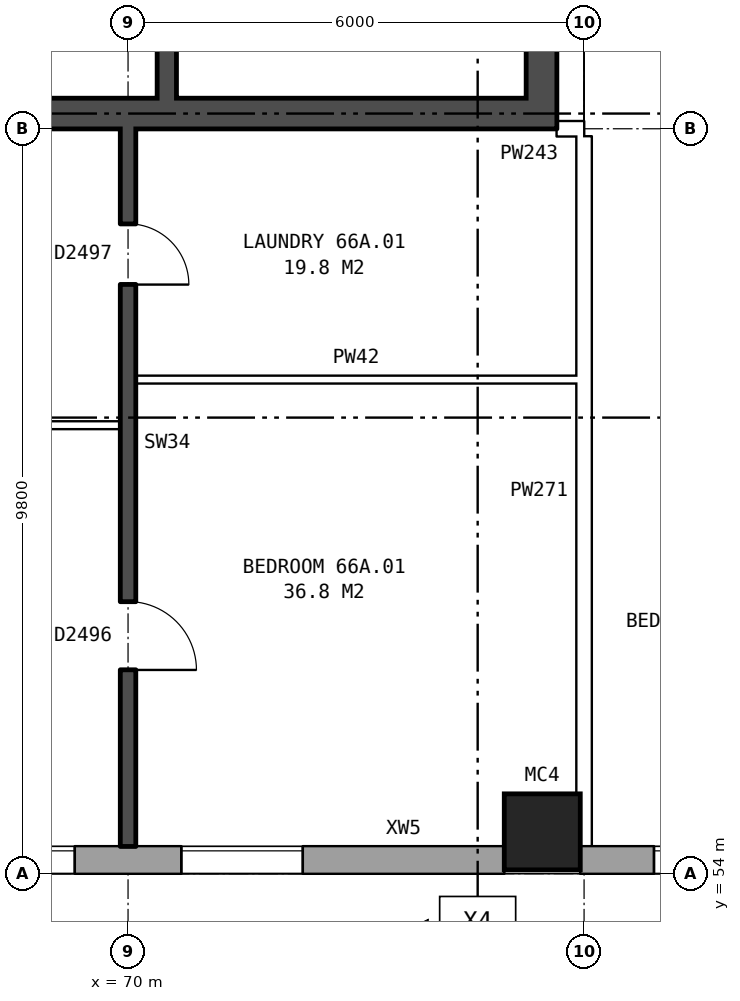
"""IFC4 building model, lengths in metres.
Left out: names, types, materials, properties, quantities, classifications, styles, units other than length and angle.
Written with IfcOpenShell. Run it as: python <this file> out.ifc"""

import sys

from ifc_helpers import new_model, si_unit, direction, frame, frame_2d, origin, origin_2d, place, context, subcontext, project, spatial, rectangle, hollow_rectangle, extrude, element, fill, save


model = new_model("IFC4")
c1 = context("Model", 3, precision=1e-05, world=origin(), true_north=direction((0.0, 1.0)))
c2 = subcontext(c1, "Body", "Model", "MODEL_VIEW")
j1 = project(units=[si_unit("LENGTHUNIT", "METRE"), si_unit("PLANEANGLEUNIT", "RADIAN")], contexts=[c1])
p1 = place(None, origin())
s1 = spatial("IfcSite", under=j1, at=p1, CompositionType="ELEMENT")
p2 = place(p1, origin())
s2 = spatial("IfcBuilding", under=s1, at=p2, CompositionType="ELEMENT")
p3 = place(p2, frame((0.0, 0.0, 233.8)))
s3 = spatial("IfcBuildingStorey", under=s2, at=p3, CompositionType="ELEMENT", Elevation=233.8)
p4 = place(p3, frame((75.45, 54.55, 0.0), z_axis=(0.0, 0.0, 1.0), x_axis=(1.0, 0.0, 0.0)))
e1 = element("IfcColumn", 1, at=p4, inside=s3, PredefinedType="COLUMN", context=c2, shape_type="SweptSolid", body=[
    extrude(hollow_rectangle(XDim=1.0, YDim=1.0, WallThickness=0.055, at=origin_2d()), origin(), (0.0, 0.0, 1.0), 3.1),
])
p5 = place(p3, frame((35.075, 54.18, 0.0), z_axis=(0.0, 0.0, 1.0), x_axis=(1.0, 0.0, 0.0)))
e2 = element("IfcWall", 2, at=p5, inside=s3, PredefinedType="STANDARD", context=c2, shape_type="SweptSolid", body=[
    extrude(rectangle(XDim=39.875, YDim=0.36, at=frame_2d((19.938, 0.0))), origin(), (0.0, 0.0, 1.0), 2.85),
])
p6 = place(p5, frame((2.625, 0.0, 0.8)))
e3 = element("IfcOpeningElement", 3, at=p6, cuts=e2, PredefinedType="OPENING", context=c2, shape_type="SweptSolid", body=[
    extrude(rectangle(XDim=1.6, YDim=1.8, at=frame_2d((0.8, 0.9))), frame((0.0, 0.19, 0.0), z_axis=(0.0, -1.0, 0.0), x_axis=(1.0, 0.0, 0.0)), (0.0, 0.0, 1.0), 0.38),
])
p7 = place(p5, frame((5.625, 0.0, 0.8)))
e4 = element("IfcOpeningElement", 4, at=p7, cuts=e2, PredefinedType="OPENING", context=c2, shape_type="SweptSolid", body=[
    extrude(rectangle(XDim=1.6, YDim=1.8, at=frame_2d((0.8, 0.9))), frame((0.0, 0.19, 0.0), z_axis=(0.0, -1.0, 0.0), x_axis=(1.0, 0.0, 0.0)), (0.0, 0.0, 1.0), 0.38),
])
p8 = place(p5, frame((8.625, 0.0, 0.8)))
e5 = element("IfcOpeningElement", 5, at=p8, cuts=e2, PredefinedType="OPENING", context=c2, shape_type="SweptSolid", body=[
    extrude(rectangle(XDim=1.6, YDim=1.8, at=frame_2d((0.8, 0.9))), frame((0.0, 0.19, 0.0), z_axis=(0.0, -1.0, 0.0), x_axis=(1.0, 0.0, 0.0)), (0.0, 0.0, 1.0), 0.38),
])
p9 = place(p5, frame((11.625, 0.0, 0.8)))
e6 = element("IfcOpeningElement", 6, at=p9, cuts=e2, PredefinedType="OPENING", context=c2, shape_type="SweptSolid", body=[
    extrude(rectangle(XDim=1.6, YDim=1.8, at=frame_2d((0.8, 0.9))), frame((0.0, 0.19, 0.0), z_axis=(0.0, -1.0, 0.0), x_axis=(1.0, 0.0, 0.0)), (0.0, 0.0, 1.0), 0.38),
])
p10 = place(p5, frame((14.625, 0.0, 0.8)))
e7 = element("IfcOpeningElement", 7, at=p10, cuts=e2, PredefinedType="OPENING", context=c2, shape_type="SweptSolid", body=[
    extrude(rectangle(XDim=1.6, YDim=1.8, at=frame_2d((0.8, 0.9))), frame((0.0, 0.19, 0.0), z_axis=(0.0, -1.0, 0.0), x_axis=(1.0, 0.0, 0.0)), (0.0, 0.0, 1.0), 0.38),
])
p11 = place(p5, frame((18.475, 0.0, 0.15)))
e8 = element("IfcOpeningElement", 8, at=p11, cuts=e2, PredefinedType="OPENING", context=c2, shape_type="SweptSolid", body=[
    extrude(rectangle(XDim=0.8, YDim=0.9, at=frame_2d((0.4, 0.45))), frame((0.0, 0.19, 0.0), z_axis=(0.0, -1.0, 0.0), x_axis=(1.0, 0.0, 0.0)), (0.0, 0.0, 1.0), 0.38),
])
p12 = place(p5, frame((20.625, 0.0, 0.8)))
e9 = element("IfcOpeningElement", 9, at=p12, cuts=e2, PredefinedType="OPENING", context=c2, shape_type="SweptSolid", body=[
    extrude(rectangle(XDim=1.6, YDim=1.8, at=frame_2d((0.8, 0.9))), frame((0.0, 0.19, 0.0), z_axis=(0.0, -1.0, 0.0), x_axis=(1.0, 0.0, 0.0)), (0.0, 0.0, 1.0), 0.38),
])
p13 = place(p5, frame((23.625, 0.0, 0.8)))
e10 = element("IfcOpeningElement", 10, at=p13, cuts=e2, PredefinedType="OPENING", context=c2, shape_type="SweptSolid", body=[
    extrude(rectangle(XDim=1.6, YDim=1.8, at=frame_2d((0.8, 0.9))), frame((0.0, 0.19, 0.0), z_axis=(0.0, -1.0, 0.0), x_axis=(1.0, 0.0, 0.0)), (0.0, 0.0, 1.0), 0.38),
])
p14 = place(p5, frame((26.625, 0.0, 0.8)))
e11 = element("IfcOpeningElement", 11, at=p14, cuts=e2, PredefinedType="OPENING", context=c2, shape_type="SweptSolid", body=[
    extrude(rectangle(XDim=1.6, YDim=1.8, at=frame_2d((0.8, 0.9))), frame((0.0, 0.19, 0.0), z_axis=(0.0, -1.0, 0.0), x_axis=(1.0, 0.0, 0.0)), (0.0, 0.0, 1.0), 0.38),
])
p15 = place(p5, frame((29.625, 0.0, 0.8)))
e12 = element("IfcOpeningElement", 12, at=p15, cuts=e2, PredefinedType="OPENING", context=c2, shape_type="SweptSolid", body=[
    extrude(rectangle(XDim=1.6, YDim=1.8, at=frame_2d((0.8, 0.9))), frame((0.0, 0.19, 0.0), z_axis=(0.0, -1.0, 0.0), x_axis=(1.0, 0.0, 0.0)), (0.0, 0.0, 1.0), 0.38),
])
p16 = place(p5, frame((32.625, 0.0, 0.8)))
e13 = element("IfcOpeningElement", 13, at=p16, cuts=e2, PredefinedType="OPENING", context=c2, shape_type="SweptSolid", body=[
    extrude(rectangle(XDim=1.6, YDim=1.8, at=frame_2d((0.8, 0.9))), frame((0.0, 0.19, 0.0), z_axis=(0.0, -1.0, 0.0), x_axis=(1.0, 0.0, 0.0)), (0.0, 0.0, 1.0), 0.38),
])
p17 = place(p5, frame((35.625, 0.0, 0.8)))
e14 = element("IfcOpeningElement", 14, at=p17, cuts=e2, PredefinedType="OPENING", context=c2, shape_type="SweptSolid", body=[
    extrude(rectangle(XDim=1.6, YDim=1.8, at=frame_2d((0.8, 0.9))), frame((0.0, 0.19, 0.0), z_axis=(0.0, -1.0, 0.0), x_axis=(1.0, 0.0, 0.0)), (0.0, 0.0, 1.0), 0.38),
])
p18 = place(p3, frame((75.95, 54.18, 0.0), z_axis=(0.0, 0.0, 1.0), x_axis=(1.0, 0.0, 0.0)))
e15 = element("IfcWall", 15, at=p18, inside=s3, PredefinedType="STANDARD", context=c2, shape_type="SweptSolid", body=[
    extrude(rectangle(XDim=55.1, YDim=0.36, at=frame_2d((27.55, 0.0))), origin(), (0.0, 0.0, 1.0), 2.85),
])
p19 = place(p18, frame((0.969, 0.0, 0.8)))
e16 = element("IfcOpeningElement", 16, at=p19, cuts=e15, PredefinedType="OPENING", context=c2, shape_type="SweptSolid", body=[
    extrude(rectangle(XDim=1.6, YDim=1.8, at=frame_2d((0.8, 0.9))), frame((0.0, 0.19, 0.0), z_axis=(0.0, -1.0, 0.0), x_axis=(1.0, 0.0, 0.0)), (0.0, 0.0, 1.0), 0.38),
])
p20 = place(p18, frame((4.406, 0.0, 0.8)))
e17 = element("IfcOpeningElement", 17, at=p20, cuts=e15, PredefinedType="OPENING", context=c2, shape_type="SweptSolid", body=[
    extrude(rectangle(XDim=1.6, YDim=1.8, at=frame_2d((0.8, 0.9))), frame((0.0, 0.19, 0.0), z_axis=(0.0, -1.0, 0.0), x_axis=(1.0, 0.0, 0.0)), (0.0, 0.0, 1.0), 0.38),
])
p21 = place(p18, frame((7.844, 0.0, 0.8)))
e18 = element("IfcOpeningElement", 18, at=p21, cuts=e15, PredefinedType="OPENING", context=c2, shape_type="SweptSolid", body=[
    extrude(rectangle(XDim=1.6, YDim=1.8, at=frame_2d((0.8, 0.9))), frame((0.0, 0.19, 0.0), z_axis=(0.0, -1.0, 0.0), x_axis=(1.0, 0.0, 0.0)), (0.0, 0.0, 1.0), 0.38),
])
p22 = place(p18, frame((11.281, 0.0, 0.8)))
e19 = element("IfcOpeningElement", 19, at=p22, cuts=e15, PredefinedType="OPENING", context=c2, shape_type="SweptSolid", body=[
    extrude(rectangle(XDim=1.6, YDim=1.8, at=frame_2d((0.8, 0.9))), frame((0.0, 0.19, 0.0), z_axis=(0.0, -1.0, 0.0), x_axis=(1.0, 0.0, 0.0)), (0.0, 0.0, 1.0), 0.38),
])
p23 = place(p18, frame((14.719, 0.0, 0.8)))
e20 = element("IfcOpeningElement", 20, at=p23, cuts=e15, PredefinedType="OPENING", context=c2, shape_type="SweptSolid", body=[
    extrude(rectangle(XDim=1.6, YDim=1.8, at=frame_2d((0.8, 0.9))), frame((0.0, 0.19, 0.0), z_axis=(0.0, -1.0, 0.0), x_axis=(1.0, 0.0, 0.0)), (0.0, 0.0, 1.0), 0.38),
])
p24 = place(p18, frame((18.156, 0.0, 0.8)))
e21 = element("IfcOpeningElement", 21, at=p24, cuts=e15, PredefinedType="OPENING", context=c2, shape_type="SweptSolid", body=[
    extrude(rectangle(XDim=1.6, YDim=1.8, at=frame_2d((0.8, 0.9))), frame((0.0, 0.19, 0.0), z_axis=(0.0, -1.0, 0.0), x_axis=(1.0, 0.0, 0.0)), (0.0, 0.0, 1.0), 0.38),
])
p25 = place(p18, frame((21.594, 0.0, 0.8)))
e22 = element("IfcOpeningElement", 22, at=p25, cuts=e15, PredefinedType="OPENING", context=c2, shape_type="SweptSolid", body=[
    extrude(rectangle(XDim=1.6, YDim=1.8, at=frame_2d((0.8, 0.9))), frame((0.0, 0.19, 0.0), z_axis=(0.0, -1.0, 0.0), x_axis=(1.0, 0.0, 0.0)), (0.0, 0.0, 1.0), 0.38),
])
p26 = place(p18, frame((25.031, 0.0, 0.8)))
e23 = element("IfcOpeningElement", 23, at=p26, cuts=e15, PredefinedType="OPENING", context=c2, shape_type="SweptSolid", body=[
    extrude(rectangle(XDim=1.6, YDim=1.8, at=frame_2d((0.8, 0.9))), frame((0.0, 0.19, 0.0), z_axis=(0.0, -1.0, 0.0), x_axis=(1.0, 0.0, 0.0)), (0.0, 0.0, 1.0), 0.38),
])
p27 = place(p18, frame((28.469, 0.0, 0.8)))
e24 = element("IfcOpeningElement", 24, at=p27, cuts=e15, PredefinedType="OPENING", context=c2, shape_type="SweptSolid", body=[
    extrude(rectangle(XDim=1.6, YDim=1.8, at=frame_2d((0.8, 0.9))), frame((0.0, 0.19, 0.0), z_axis=(0.0, -1.0, 0.0), x_axis=(1.0, 0.0, 0.0)), (0.0, 0.0, 1.0), 0.38),
])
p28 = place(p18, frame((31.906, 0.0, 0.8)))
e25 = element("IfcOpeningElement", 25, at=p28, cuts=e15, PredefinedType="OPENING", context=c2, shape_type="SweptSolid", body=[
    extrude(rectangle(XDim=1.6, YDim=1.8, at=frame_2d((0.8, 0.9))), frame((0.0, 0.19, 0.0), z_axis=(0.0, -1.0, 0.0), x_axis=(1.0, 0.0, 0.0)), (0.0, 0.0, 1.0), 0.38),
])
p29 = place(p18, frame((35.344, 0.0, 0.8)))
e26 = element("IfcOpeningElement", 26, at=p29, cuts=e15, PredefinedType="OPENING", context=c2, shape_type="SweptSolid", body=[
    extrude(rectangle(XDim=1.6, YDim=1.8, at=frame_2d((0.8, 0.9))), frame((0.0, 0.19, 0.0), z_axis=(0.0, -1.0, 0.0), x_axis=(1.0, 0.0, 0.0)), (0.0, 0.0, 1.0), 0.38),
])
p30 = place(p18, frame((38.781, 0.0, 0.8)))
e27 = element("IfcOpeningElement", 27, at=p30, cuts=e15, PredefinedType="OPENING", context=c2, shape_type="SweptSolid", body=[
    extrude(rectangle(XDim=1.6, YDim=1.8, at=frame_2d((0.8, 0.9))), frame((0.0, 0.19, 0.0), z_axis=(0.0, -1.0, 0.0), x_axis=(1.0, 0.0, 0.0)), (0.0, 0.0, 1.0), 0.38),
])
p31 = place(p18, frame((42.219, 0.0, 0.8)))
e28 = element("IfcOpeningElement", 28, at=p31, cuts=e15, PredefinedType="OPENING", context=c2, shape_type="SweptSolid", body=[
    extrude(rectangle(XDim=1.6, YDim=1.8, at=frame_2d((0.8, 0.9))), frame((0.0, 0.19, 0.0), z_axis=(0.0, -1.0, 0.0), x_axis=(1.0, 0.0, 0.0)), (0.0, 0.0, 1.0), 0.38),
])
p32 = place(p18, frame((45.656, 0.0, 0.8)))
e29 = element("IfcOpeningElement", 29, at=p32, cuts=e15, PredefinedType="OPENING", context=c2, shape_type="SweptSolid", body=[
    extrude(rectangle(XDim=1.6, YDim=1.8, at=frame_2d((0.8, 0.9))), frame((0.0, 0.19, 0.0), z_axis=(0.0, -1.0, 0.0), x_axis=(1.0, 0.0, 0.0)), (0.0, 0.0, 1.0), 0.38),
])
p33 = place(p18, frame((49.094, 0.0, 0.8)))
e30 = element("IfcOpeningElement", 30, at=p33, cuts=e15, PredefinedType="OPENING", context=c2, shape_type="SweptSolid", body=[
    extrude(rectangle(XDim=1.6, YDim=1.8, at=frame_2d((0.8, 0.9))), frame((0.0, 0.19, 0.0), z_axis=(0.0, -1.0, 0.0), x_axis=(1.0, 0.0, 0.0)), (0.0, 0.0, 1.0), 0.38),
])
p34 = place(p18, frame((52.531, 0.0, 0.8)))
e31 = element("IfcOpeningElement", 31, at=p34, cuts=e15, PredefinedType="OPENING", context=c2, shape_type="SweptSolid", body=[
    extrude(rectangle(XDim=1.6, YDim=1.8, at=frame_2d((0.8, 0.9))), frame((0.0, 0.19, 0.0), z_axis=(0.0, -1.0, 0.0), x_axis=(1.0, 0.0, 0.0)), (0.0, 0.0, 1.0), 0.38),
])
p35 = place(p3, frame((75.44, 63.8, 0.0), z_axis=(0.0, 0.0, 1.0), x_axis=(0.0, 1.0, 0.0)))
e32 = element("IfcWall", 32, at=p35, inside=s3, PredefinedType="SHEAR", context=c2, shape_type="SweptSolid", body=[
    extrude(rectangle(XDim=12.4, YDim=0.4, at=frame_2d((6.2, 0.0))), origin(), (0.0, 0.0, 1.0), 2.85),
])
p36 = place(p35, frame((9.8, 0.0, 0.0)))
e33 = element("IfcOpeningElement", 33, at=p36, cuts=e32, PredefinedType="OPENING", context=c2, shape_type="SweptSolid", body=[
    extrude(rectangle(XDim=1.1, YDim=2.1, at=frame_2d((0.55, 1.05))), frame((0.0, 0.21, 0.0), z_axis=(0.0, -1.0, 0.0), x_axis=(1.0, 0.0, 0.0)), (0.0, 0.0, 1.0), 0.42),
])
p37 = place(p3, frame((67.04, 64.0, 0.0), z_axis=(0.0, 0.0, 1.0), x_axis=(1.0, 0.0, 0.0)))
e34 = element("IfcWall", 34, at=p37, inside=s3, PredefinedType="SHEAR", context=c2, shape_type="SweptSolid", body=[
    extrude(rectangle(XDim=8.2, YDim=0.4, at=frame_2d((4.1, 0.0))), origin(), (0.0, 0.0, 1.0), 2.85),
])
p38 = place(p3, frame((70.51, 64.2, 0.0), z_axis=(0.0, 0.0, 1.0), x_axis=(0.0, 1.0, 0.0)))
e35 = element("IfcWall", 35, at=p38, inside=s3, PredefinedType="SHEAR", context=c2, shape_type="SweptSolid", body=[
    extrude(rectangle(XDim=2.525, YDim=0.25, at=frame_2d((1.263, 0.0))), origin(), (0.0, 0.0, 1.0), 2.85),
])
p39 = place(p3, frame((64.1, 59.9, 0.0), z_axis=(0.0, 0.0, 1.0), x_axis=(1.0, 0.0, 0.0)))
e36 = element("IfcWall", 36, at=p39, inside=s3, PredefinedType="PARTITIONING", context=c2, shape_type="SweptSolid", body=[
    extrude(rectangle(XDim=5.8, YDim=0.1, at=frame_2d((2.9, 0.0))), origin(), (0.0, 0.0, 1.0), 2.85),
])
p40 = place(p39, frame((3.6, 0.0, 0.0)))
e37 = element("IfcOpeningElement", 37, at=p40, cuts=e36, PredefinedType="OPENING", context=c2, shape_type="SweptSolid", body=[
    extrude(rectangle(XDim=0.9, YDim=2.1, at=frame_2d((0.45, 1.05))), frame((0.0, 0.06, 0.0), z_axis=(0.0, -1.0, 0.0), x_axis=(1.0, 0.0, 0.0)), (0.0, 0.0, 1.0), 0.12),
])
p41 = place(p39, frame((0.7, 0.0, 0.0)))
e38 = element("IfcOpeningElement", 38, at=p41, cuts=e36, PredefinedType="OPENING", context=c2, shape_type="SweptSolid", body=[
    extrude(rectangle(XDim=0.9, YDim=2.1, at=frame_2d((0.45, 1.05))), frame((0.0, 0.06, 0.0), z_axis=(0.0, -1.0, 0.0), x_axis=(1.0, 0.0, 0.0)), (0.0, 0.0, 1.0), 0.12),
])
p42 = place(p3, frame((70.1, 60.5, 0.0), z_axis=(0.0, 0.0, 1.0), x_axis=(1.0, 0.0, 0.0)))
e39 = element("IfcWall", 39, at=p42, inside=s3, PredefinedType="PARTITIONING", context=c2, shape_type="SweptSolid", body=[
    extrude(rectangle(XDim=5.8, YDim=0.1, at=frame_2d((2.9, 0.0))), origin(), (0.0, 0.0, 1.0), 2.85),
])
p43 = place(p3, frame((75.64, 63.8, 0.0), z_axis=(0.0, 0.0, 1.0), x_axis=(1.0, 0.0, 0.0)))
e40 = element("IfcWall", 40, at=p43, inside=s3, PredefinedType="PARTITIONING", context=c2, shape_type="SweptSolid", body=[
    extrude(rectangle(XDim=0.36, YDim=0.2, at=frame_2d((0.18, 0.0))), origin(), (0.0, 0.0, 1.0), 2.85),
])
p44 = place(p3, frame((70.0, 54.36, 0.0), z_axis=(0.0, 0.0, 1.0), x_axis=(0.0, 1.0, 0.0)))
e41 = element("IfcWall", 41, at=p44, inside=s3, PredefinedType="SOLIDWALL", context=c2, shape_type="SweptSolid", body=[
    extrude(rectangle(XDim=9.44, YDim=0.2, at=frame_2d((4.72, 0.0))), origin(), (0.0, 0.0, 1.0), 2.85),
])
p45 = place(p44, frame((2.32, 0.0, 0.0)))
e42 = element("IfcOpeningElement", 42, at=p45, cuts=e41, PredefinedType="OPENING", context=c2, shape_type="SweptSolid", body=[
    extrude(rectangle(XDim=0.9, YDim=2.1, at=frame_2d((0.45, 1.05))), frame((0.0, 0.11, 0.0), z_axis=(0.0, -1.0, 0.0), x_axis=(1.0, 0.0, 0.0)), (0.0, 0.0, 1.0), 0.22),
])
p46 = place(p44, frame((7.39, 0.0, 0.0)))
e43 = element("IfcOpeningElement", 43, at=p46, cuts=e41, PredefinedType="OPENING", context=c2, shape_type="SweptSolid", body=[
    extrude(rectangle(XDim=0.8, YDim=2.1, at=frame_2d((0.4, 1.05))), frame((0.0, 0.11, 0.0), z_axis=(0.0, -1.0, 0.0), x_axis=(1.0, 0.0, 0.0)), (0.0, 0.0, 1.0), 0.22),
])
p47 = place(p3, frame((76.0, 54.36, 0.0), z_axis=(0.0, 0.0, 1.0), x_axis=(0.0, 1.0, 0.0)))
e44 = element("IfcWall", 44, at=p47, inside=s3, PredefinedType="PARTITIONING", context=c2, shape_type="SweptSolid", body=[
    extrude(rectangle(XDim=9.34, YDim=0.2, at=frame_2d((4.67, 0.0))), origin(), (0.0, 0.0, 1.0), 2.85),
])
p48 = place(p16, origin())
e45 = element("IfcWindow", 45, at=p48, inside=s3, PartitioningType="SINGLE_PANEL", PredefinedType="WINDOW", context=c2, shape_type="SweptSolid", body=[
    extrude(rectangle(XDim=1.6, YDim=1.8, at=frame_2d((0.8, 0.9))), frame((0.0, 0.15, 0.0), z_axis=(0.0, -1.0, 0.0), x_axis=(1.0, 0.0, 0.0)), (0.0, 0.0, 1.0), 0.06),
])
fill(e13, e45)
p49 = place(p17, origin())
e46 = element("IfcWindow", 46, at=p49, inside=s3, PartitioningType="SINGLE_PANEL", PredefinedType="WINDOW", context=c2, shape_type="SweptSolid", body=[
    extrude(rectangle(XDim=1.6, YDim=1.8, at=frame_2d((0.8, 0.9))), frame((0.0, 0.15, 0.0), z_axis=(0.0, -1.0, 0.0), x_axis=(1.0, 0.0, 0.0)), (0.0, 0.0, 1.0), 0.06),
])
fill(e14, e46)
p50 = place(p19, origin())
e47 = element("IfcWindow", 47, at=p50, inside=s3, PartitioningType="SINGLE_PANEL", PredefinedType="WINDOW", context=c2, shape_type="SweptSolid", body=[
    extrude(rectangle(XDim=1.6, YDim=1.8, at=frame_2d((0.8, 0.9))), frame((0.0, 0.15, 0.0), z_axis=(0.0, -1.0, 0.0), x_axis=(1.0, 0.0, 0.0)), (0.0, 0.0, 1.0), 0.06),
])
fill(e16, e47)
p51 = place(p45, frame((0.9, 0.0, 0.0), z_axis=(0.0, 0.0, 1.0), x_axis=(-1.0, 0.0, 0.0)))
e48 = element("IfcDoor", 48, at=p51, inside=s3, OperationType="SINGLE_SWING_RIGHT", PredefinedType="DOOR", context=c2, shape_type="SweptSolid", body=[
    extrude(rectangle(XDim=0.9, YDim=2.1, at=frame_2d((0.45, 1.05))), frame((0.0, 0.025, 0.0), z_axis=(0.0, -1.0, 0.0), x_axis=(1.0, 0.0, 0.0)), (0.0, 0.0, 1.0), 0.05),
])
fill(e42, e48)
p52 = place(p46, frame((0.8, 0.0, 0.0), z_axis=(0.0, 0.0, 1.0), x_axis=(-1.0, 0.0, 0.0)))
e49 = element("IfcDoor", 49, at=p52, inside=s3, OperationType="SINGLE_SWING_RIGHT", PredefinedType="DOOR", context=c2, shape_type="SweptSolid", body=[
    extrude(rectangle(XDim=0.8, YDim=2.1, at=frame_2d((0.4, 1.05))), frame((0.0, 0.025, 0.0), z_axis=(0.0, -1.0, 0.0), x_axis=(1.0, 0.0, 0.0)), (0.0, 0.0, 1.0), 0.05),
])
fill(e43, e49)
save(model, sys.argv[1])
